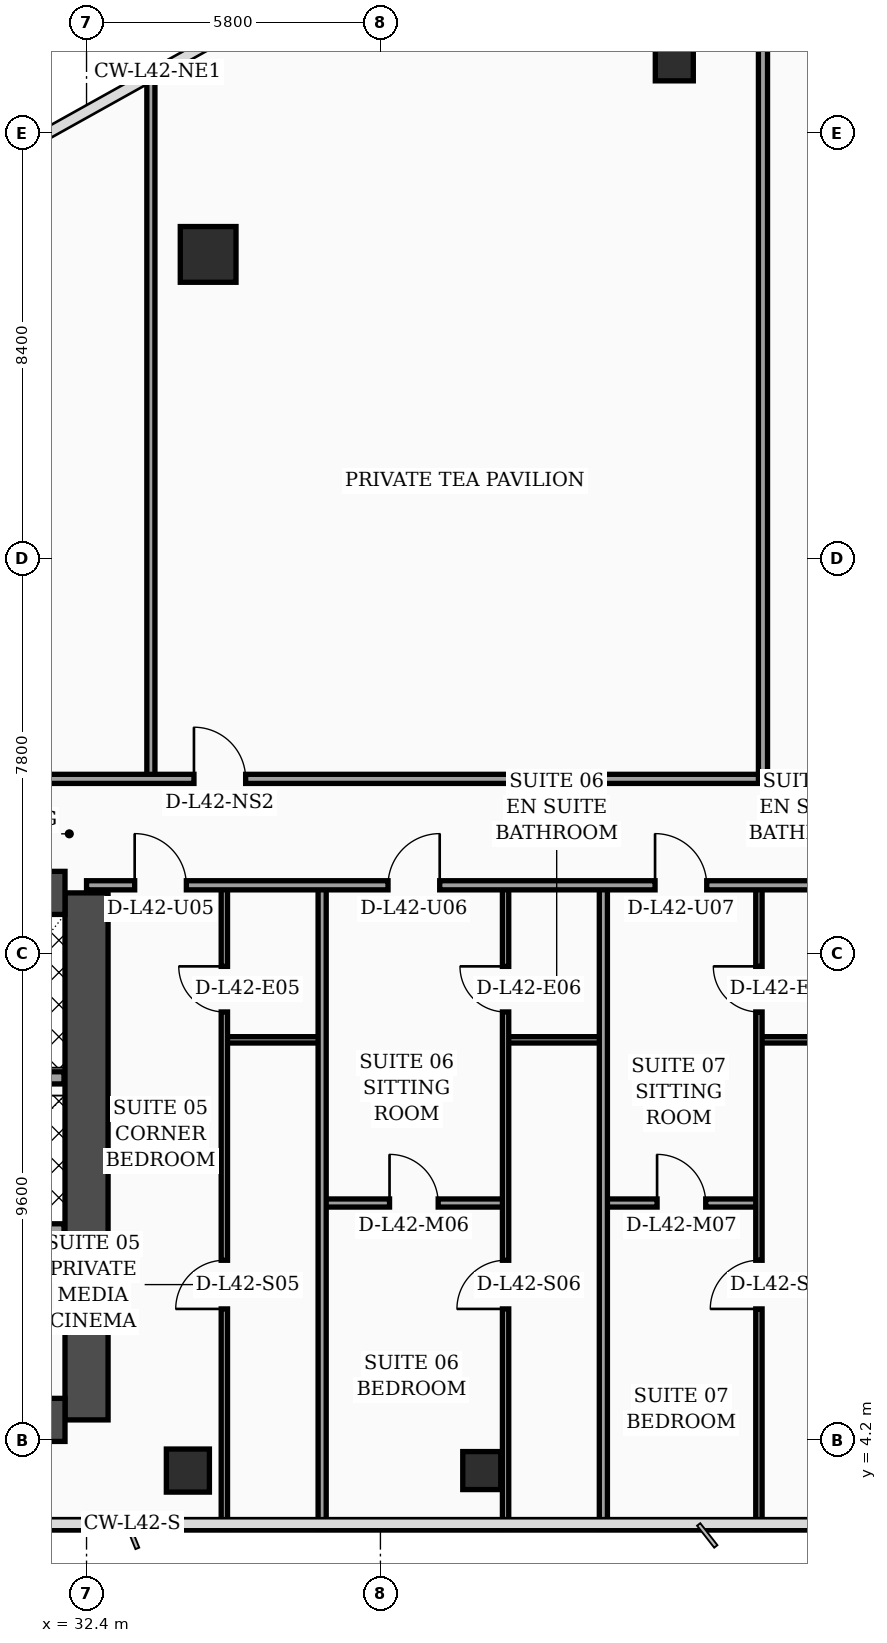
"""IFC4 building model, lengths in metres.
Left out: names, types, materials, properties, quantities, classifications, styles, units other than length and angle.
Written with IfcOpenShell. Run it as: python <this file> out.ifc"""

import sys

from ifc_helpers import new_model, si_unit, direction, frame, frame_2d, origin, origin_2d, place, context, subcontext, project, spatial, rectangle, hollow_rectangle, circle, extrude, element, fill, save


model = new_model("IFC4")
c1 = context("Model", 3, precision=1e-05, world=origin(), true_north=direction((0.0, 1.0)))
c2 = subcontext(c1, "Body", "Model", "MODEL_VIEW")
j1 = project(units=[si_unit("LENGTHUNIT", "METRE"), si_unit("PLANEANGLEUNIT", "RADIAN")], contexts=[c1])
p1 = place(None, origin())
s1 = spatial("IfcSite", under=j1, at=p1, CompositionType="ELEMENT")
p2 = place(p1, origin())
s2 = spatial("IfcBuilding", under=s1, at=p2, CompositionType="ELEMENT")
p3 = place(p2, frame((0.0, 0.0, 171.3)))
s3 = spatial("IfcBuildingStorey", under=s2, at=p3, CompositionType="ELEMENT", Elevation=171.3)
p4 = place(p3, frame((32.4, 4.6, 0.0), z_axis=(0.0, 0.0, 1.0), x_axis=(0.0, 1.0, 0.0)))
e1 = element("IfcWall", 1, at=p4, inside=s3, PredefinedType="SHEAR", context=c2, shape_type="SweptSolid", body=[
    extrude(rectangle(XDim=10.4, YDim=0.85, at=frame_2d((5.2, 0.0))), origin(), (0.0, 0.0, 1.0), 3.56),
])
p5 = place(p3, frame((22.025, 15.0, 0.0), z_axis=(0.0, 0.0, 1.0), x_axis=(1.0, 0.0, 0.0)))
e2 = element("IfcWall", 2, at=p5, inside=s3, PredefinedType="SHEAR", context=c2, shape_type="SweptSolid", body=[
    extrude(rectangle(XDim=9.95, YDim=0.85, at=frame_2d((4.975, 0.0))), origin(), (0.0, 0.0, 1.0), 3.56),
])
p6 = place(p5, frame((4.88, 0.0, 0.0)))
e3 = element("IfcOpeningElement", 3, at=p6, cuts=e2, PredefinedType="OPENING", context=c2, shape_type="SweptSolid", body=[
    extrude(rectangle(XDim=1.1, YDim=2.2, at=frame_2d((0.55, 1.1))), frame((0.0, 0.435, 0.0), z_axis=(0.0, -1.0, 0.0), x_axis=(1.0, 0.0, 0.0)), (0.0, 0.0, 1.0), 0.87),
])
p7 = place(p3, frame((22.025, 4.6, 0.0), z_axis=(0.0, 0.0, 1.0), x_axis=(1.0, 0.0, 0.0)))
e4 = element("IfcWall", 4, at=p7, inside=s3, PredefinedType="SHEAR", context=c2, shape_type="SweptSolid", body=[
    extrude(rectangle(XDim=9.95, YDim=0.85, at=frame_2d((4.975, 0.0))), origin(), (0.0, 0.0, 1.0), 3.56),
])
p8 = place(p3, frame((34.4, 3.6, 0.0), z_axis=(0.0, 0.0, 1.0), x_axis=(1.0, 0.0, 0.0)))
e5 = element("IfcColumn", 5, at=p8, inside=s3, PredefinedType="COLUMN", context=c2, shape_type="SweptSolid", body=[
    extrude(hollow_rectangle(XDim=0.85, YDim=0.85, WallThickness=0.036, at=origin_2d()), origin(), (0.0, 0.0, 1.0), 3.56),
])
p9 = place(p3, frame((40.2, 3.6, 0.0), z_axis=(0.0, 0.0, 1.0), x_axis=(1.0, 0.0, 0.0)))
e6 = element("IfcColumn", 6, at=p9, inside=s3, PredefinedType="COLUMN", context=c2, shape_type="SweptSolid", body=[
    extrude(hollow_rectangle(XDim=0.75, YDim=0.75, WallThickness=0.032, at=origin_2d()), origin(), (0.0, 0.0, 1.0), 3.56),
])
p10 = place(p3, frame((34.8, 27.6, 0.0), z_axis=(0.0, 0.0, 1.0), x_axis=(1.0, 0.0, 0.0)))
e7 = element("IfcColumn", 7, at=p10, inside=s3, PredefinedType="COLUMN", context=c2, shape_type="SweptSolid", body=[
    extrude(circle(Radius=0.55, at=origin_2d()), origin(), (0.0, 0.0, 1.0), 3.56),
])
p11 = place(p3, frame((44.0, 31.4, 0.0), z_axis=(0.0, 0.0, 1.0), x_axis=(1.0, 0.0, 0.0)))
e8 = element("IfcColumn", 8, at=p11, inside=s3, PredefinedType="COLUMN", context=c2, shape_type="SweptSolid", body=[
    extrude(hollow_rectangle(XDim=0.75, YDim=0.75, WallThickness=0.032, at=origin_2d()), origin(), (0.0, 0.0, 1.0), 3.56),
])
p12 = place(p3, frame((27.02, 11.35, 0.0), z_axis=(0.0, 0.0, 1.0), x_axis=(1.0, 0.0, 0.0)))
e9 = element("IfcWall", 9, at=p12, inside=s3, PredefinedType="SOLIDWALL", context=c2, shape_type="SweptSolid", body=[
    extrude(rectangle(XDim=4.935, YDim=0.24, at=frame_2d((2.468, 0.0))), origin(), (0.0, 0.0, 1.0), 3.56),
])
p13 = place(p12, frame((0.45, 0.0, 0.0)))
e10 = element("IfcOpeningElement", 10, at=p13, cuts=e9, PredefinedType="OPENING", context=c2, shape_type="SweptSolid", body=[
    extrude(rectangle(XDim=1.3, YDim=2.35, at=frame_2d((0.65, 1.175))), frame((0.0, 0.13, 0.0), z_axis=(0.0, -1.0, 0.0), x_axis=(1.0, 0.0, 0.0)), (0.0, 0.0, 1.0), 0.26),
])
p14 = place(p3, frame((27.02, 8.35, 0.0), z_axis=(0.0, 0.0, 1.0), x_axis=(1.0, 0.0, 0.0)))
e11 = element("IfcWall", 11, at=p14, inside=s3, PredefinedType="SOLIDWALL", context=c2, shape_type="SweptSolid", body=[
    extrude(rectangle(XDim=4.935, YDim=0.24, at=frame_2d((2.468, 0.0))), origin(), (0.0, 0.0, 1.0), 3.56),
])
p15 = place(p3, frame((35.12, 12.1, 0.0), z_axis=(0.0, 0.0, 1.0), x_axis=(1.0, 0.0, 0.0)))
e12 = element("IfcWall", 12, at=p15, inside=s3, PredefinedType="PARTITIONING", context=c2, shape_type="SweptSolid", body=[
    extrude(rectangle(XDim=1.93, YDim=0.125, at=frame_2d((0.965, 0.0))), origin(), (0.0, 0.0, 1.0), 3.56),
])
p16 = place(p3, frame((35.12, 2.44, 0.0), z_axis=(0.0, 0.0, 1.0), x_axis=(0.0, 1.0, 0.0)))
e13 = element("IfcWall", 13, at=p16, inside=s3, PredefinedType="PARTITIONING", context=c2, shape_type="SweptSolid", body=[
    extrude(rectangle(XDim=12.71, YDim=0.125, at=frame_2d((6.355, 0.0))), origin(), (0.0, 0.0, 1.0), 2.94),
])
p17 = place(p16, frame((4.35, 0.0, 0.0)))
e14 = element("IfcOpeningElement", 14, at=p17, cuts=e13, PredefinedType="OPENING", context=c2, shape_type="SweptSolid", body=[
    extrude(rectangle(XDim=0.96, YDim=2.2, at=frame_2d((0.48, 1.1))), frame((0.0, 0.073, 0.0), z_axis=(0.0, -1.0, 0.0), x_axis=(1.0, 0.0, 0.0)), (0.0, 0.0, 1.0), 0.145),
])
p18 = place(p16, frame((10.21, 0.0, 0.0)))
e15 = element("IfcOpeningElement", 15, at=p18, cuts=e13, PredefinedType="OPENING", context=c2, shape_type="SweptSolid", body=[
    extrude(rectangle(XDim=0.9, YDim=2.15, at=frame_2d((0.45, 1.075))), frame((0.0, 0.073, 0.0), z_axis=(0.0, -1.0, 0.0), x_axis=(1.0, 0.0, 0.0)), (0.0, 0.0, 1.0), 0.145),
])
p19 = place(p3, frame((40.67, 12.1, 0.0), z_axis=(0.0, 0.0, 1.0), x_axis=(1.0, 0.0, 0.0)))
e16 = element("IfcWall", 16, at=p19, inside=s3, PredefinedType="PARTITIONING", context=c2, shape_type="SweptSolid", body=[
    extrude(rectangle(XDim=1.93, YDim=0.125, at=frame_2d((0.965, 0.0))), origin(), (0.0, 0.0, 1.0), 3.56),
])
p20 = place(p3, frame((37.05, 8.88, 0.0), z_axis=(0.0, 0.0, 1.0), x_axis=(1.0, 0.0, 0.0)))
e17 = element("IfcWall", 17, at=p20, inside=s3, PredefinedType="PARTITIONING", context=c2, shape_type="SweptSolid", body=[
    extrude(rectangle(XDim=3.62, YDim=0.16, at=frame_2d((1.81, 0.0))), origin(), (0.0, 0.0, 1.0), 2.94),
])
p21 = place(p20, frame((1.33, 0.0, 0.0)))
e18 = element("IfcOpeningElement", 18, at=p21, cuts=e17, PredefinedType="OPENING", context=c2, shape_type="SweptSolid", body=[
    extrude(rectangle(XDim=0.96, YDim=2.2, at=frame_2d((0.48, 1.1))), frame((0.0, 0.09, 0.0), z_axis=(0.0, -1.0, 0.0), x_axis=(1.0, 0.0, 0.0)), (0.0, 0.0, 1.0), 0.18),
])
p22 = place(p3, frame((40.67, 2.44, 0.0), z_axis=(0.0, 0.0, 1.0), x_axis=(0.0, 1.0, 0.0)))
e19 = element("IfcWall", 19, at=p22, inside=s3, PredefinedType="PARTITIONING", context=c2, shape_type="SweptSolid", body=[
    extrude(rectangle(XDim=12.71, YDim=0.125, at=frame_2d((6.355, 0.0))), origin(), (0.0, 0.0, 1.0), 2.94),
])
p23 = place(p22, frame((4.35, 0.0, 0.0)))
e20 = element("IfcOpeningElement", 20, at=p23, cuts=e19, PredefinedType="OPENING", context=c2, shape_type="SweptSolid", body=[
    extrude(rectangle(XDim=0.96, YDim=2.2, at=frame_2d((0.48, 1.1))), frame((0.0, 0.073, 0.0), z_axis=(0.0, -1.0, 0.0), x_axis=(1.0, 0.0, 0.0)), (0.0, 0.0, 1.0), 0.145),
])
p24 = place(p22, frame((10.21, 0.0, 0.0)))
e21 = element("IfcOpeningElement", 21, at=p24, cuts=e19, PredefinedType="OPENING", context=c2, shape_type="SweptSolid", body=[
    extrude(rectangle(XDim=0.9, YDim=2.15, at=frame_2d((0.45, 1.075))), frame((0.0, 0.073, 0.0), z_axis=(0.0, -1.0, 0.0), x_axis=(1.0, 0.0, 0.0)), (0.0, 0.0, 1.0), 0.145),
])
p25 = place(p3, frame((37.05, 2.44, 0.0), z_axis=(0.0, 0.0, 1.0), x_axis=(0.0, 1.0, 0.0)))
e22 = element("IfcWall", 22, at=p25, inside=s3, PredefinedType="PARTITIONING", context=c2, shape_type="SweptSolid", body=[
    extrude(rectangle(XDim=12.71, YDim=0.16, at=frame_2d((6.355, 0.0))), origin(), (0.0, 0.0, 1.0), 2.94),
])
p26 = place(p3, frame((45.67, 12.1, 0.0), z_axis=(0.0, 0.0, 1.0), x_axis=(1.0, 0.0, 0.0)))
e23 = element("IfcWall", 23, at=p26, inside=s3, PredefinedType="PARTITIONING", context=c2, shape_type="SweptSolid", body=[
    extrude(rectangle(XDim=1.93, YDim=0.125, at=frame_2d((0.965, 0.0))), origin(), (0.0, 0.0, 1.0), 2.94),
])
p27 = place(p3, frame((42.6, 8.88, 0.0), z_axis=(0.0, 0.0, 1.0), x_axis=(1.0, 0.0, 0.0)))
e24 = element("IfcWall", 24, at=p27, inside=s3, PredefinedType="PARTITIONING", context=c2, shape_type="SweptSolid", body=[
    extrude(rectangle(XDim=3.07, YDim=0.16, at=frame_2d((1.535, 0.0))), origin(), (0.0, 0.0, 1.0), 3.56),
])
p28 = place(p27, frame((1.06, 0.0, 0.0)))
e25 = element("IfcOpeningElement", 25, at=p28, cuts=e24, PredefinedType="OPENING", context=c2, shape_type="SweptSolid", body=[
    extrude(rectangle(XDim=0.96, YDim=2.2, at=frame_2d((0.48, 1.1))), frame((0.0, 0.09, 0.0), z_axis=(0.0, -1.0, 0.0), x_axis=(1.0, 0.0, 0.0)), (0.0, 0.0, 1.0), 0.18),
])
p29 = place(p3, frame((45.67, 2.44, 0.0), z_axis=(0.0, 0.0, 1.0), x_axis=(0.0, 1.0, 0.0)))
e26 = element("IfcWall", 26, at=p29, inside=s3, PredefinedType="PARTITIONING", context=c2, shape_type="SweptSolid", body=[
    extrude(rectangle(XDim=12.71, YDim=0.125, at=frame_2d((6.355, 0.0))), origin(), (0.0, 0.0, 1.0), 3.04),
])
p30 = place(p29, frame((4.35, 0.0, 0.0)))
e27 = element("IfcOpeningElement", 27, at=p30, cuts=e26, PredefinedType="OPENING", context=c2, shape_type="SweptSolid", body=[
    extrude(rectangle(XDim=0.96, YDim=2.2, at=frame_2d((0.48, 1.1))), frame((0.0, 0.073, 0.0), z_axis=(0.0, -1.0, 0.0), x_axis=(1.0, 0.0, 0.0)), (0.0, 0.0, 1.0), 0.145),
])
p31 = place(p29, frame((10.21, 0.0, 0.0)))
e28 = element("IfcOpeningElement", 28, at=p31, cuts=e26, PredefinedType="OPENING", context=c2, shape_type="SweptSolid", body=[
    extrude(rectangle(XDim=0.9, YDim=2.15, at=frame_2d((0.45, 1.075))), frame((0.0, 0.073, 0.0), z_axis=(0.0, -1.0, 0.0), x_axis=(1.0, 0.0, 0.0)), (0.0, 0.0, 1.0), 0.145),
])
p32 = place(p3, frame((42.6, 2.44, 0.0), z_axis=(0.0, 0.0, 1.0), x_axis=(0.0, 1.0, 0.0)))
e29 = element("IfcWall", 29, at=p32, inside=s3, PredefinedType="PARTITIONING", context=c2, shape_type="SweptSolid", body=[
    extrude(rectangle(XDim=12.71, YDim=0.16, at=frame_2d((6.355, 0.0))), origin(), (0.0, 0.0, 1.0), 3.04),
])
p33 = place(p3, frame((32.4, 15.15, 0.0), z_axis=(0.0, 0.0, 1.0), x_axis=(1.0, 0.0, 0.0)))
e30 = element("IfcWall", 30, at=p33, inside=s3, PredefinedType="PARTITIONING", context=c2, shape_type="SweptSolid", body=[
    extrude(rectangle(XDim=20.2, YDim=0.18, at=frame_2d((10.1, 0.0))), origin(), (0.0, 0.0, 1.0), 2.94),
])
p34 = place(p33, frame((0.95, 0.0, 0.0)))
e31 = element("IfcOpeningElement", 31, at=p34, cuts=e30, PredefinedType="OPENING", context=c2, shape_type="SweptSolid", body=[
    extrude(rectangle(XDim=1.02, YDim=2.2, at=frame_2d((0.51, 1.1))), frame((0.0, 0.1, 0.0), z_axis=(0.0, -1.0, 0.0), x_axis=(1.0, 0.0, 0.0)), (0.0, 0.0, 1.0), 0.2),
])
p35 = place(p33, frame((5.95, 0.0, 0.0)))
e32 = element("IfcOpeningElement", 32, at=p35, cuts=e30, PredefinedType="OPENING", context=c2, shape_type="SweptSolid", body=[
    extrude(rectangle(XDim=1.02, YDim=2.2, at=frame_2d((0.51, 1.1))), frame((0.0, 0.1, 0.0), z_axis=(0.0, -1.0, 0.0), x_axis=(1.0, 0.0, 0.0)), (0.0, 0.0, 1.0), 0.2),
])
p36 = place(p33, frame((11.22, 0.0, 0.0)))
e33 = element("IfcOpeningElement", 33, at=p36, cuts=e30, PredefinedType="OPENING", context=c2, shape_type="SweptSolid", body=[
    extrude(rectangle(XDim=1.02, YDim=2.2, at=frame_2d((0.51, 1.1))), frame((0.0, 0.1, 0.0), z_axis=(0.0, -1.0, 0.0), x_axis=(1.0, 0.0, 0.0)), (0.0, 0.0, 1.0), 0.2),
])
p37 = place(p33, frame((16.22, 0.0, 0.0)))
e34 = element("IfcOpeningElement", 34, at=p37, cuts=e30, PredefinedType="OPENING", context=c2, shape_type="SweptSolid", body=[
    extrude(rectangle(XDim=1.02, YDim=2.2, at=frame_2d((0.51, 1.1))), frame((0.0, 0.1, 0.0), z_axis=(0.0, -1.0, 0.0), x_axis=(1.0, 0.0, 0.0)), (0.0, 0.0, 1.0), 0.2),
])
p38 = place(p3, frame((33.67, 17.25, 0.0), z_axis=(0.0, 0.0, 1.0), x_axis=(0.0, 1.0, 0.0)))
e35 = element("IfcWall", 35, at=p38, inside=s3, PredefinedType="PARTITIONING", context=c2, shape_type="SweptSolid", body=[
    extrude(rectangle(XDim=13.96, YDim=0.16, at=frame_2d((6.98, 0.0))), origin(), (0.0, 0.0, 1.0), 2.94),
])
p39 = place(p3, frame((21.5, 17.25, 0.0), z_axis=(0.0, 0.0, 1.0), x_axis=(1.0, 0.0, 0.0)))
e36 = element("IfcWall", 36, at=p39, inside=s3, PredefinedType="PARTITIONING", context=c2, shape_type="SweptSolid", body=[
    extrude(rectangle(XDim=24.25, YDim=0.18, at=frame_2d((12.125, 0.0))), origin(), (0.0, 0.0, 1.0), 2.94),
])
p40 = place(p39, frame((0.95, 0.0, 0.0)))
e37 = element("IfcOpeningElement", 37, at=p40, cuts=e36, PredefinedType="OPENING", context=c2, shape_type="SweptSolid", body=[
    extrude(rectangle(XDim=1.02, YDim=2.2, at=frame_2d((0.51, 1.1))), frame((0.0, 0.1, 0.0), z_axis=(0.0, -1.0, 0.0), x_axis=(1.0, 0.0, 0.0)), (0.0, 0.0, 1.0), 0.2),
])
p41 = place(p39, frame((13.02, 0.0, 0.0)))
e38 = element("IfcOpeningElement", 38, at=p41, cuts=e36, PredefinedType="OPENING", context=c2, shape_type="SweptSolid", body=[
    extrude(rectangle(XDim=1.02, YDim=2.2, at=frame_2d((0.51, 1.1))), frame((0.0, 0.1, 0.0), z_axis=(0.0, -1.0, 0.0), x_axis=(1.0, 0.0, 0.0)), (0.0, 0.0, 1.0), 0.2),
])
p42 = place(p3, frame((45.75, 17.25, 0.0), z_axis=(0.0, 0.0, 1.0), x_axis=(0.0, 1.0, 0.0)))
e39 = element("IfcWall", 39, at=p42, inside=s3, PredefinedType="PARTITIONING", context=c2, shape_type="SweptSolid", body=[
    extrude(rectangle(XDim=20.69, YDim=0.18, at=frame_2d((10.345, 0.0))), origin(), (0.0, 0.0, 1.0), 2.94),
])
p43 = place(p17, origin())
e40 = element("IfcDoor", 40, at=p43, inside=s3, OperationType="SINGLE_SWING_LEFT", PredefinedType="DOOR", context=c2, shape_type="SweptSolid", body=[
    extrude(rectangle(XDim=0.96, YDim=2.2, at=frame_2d((0.48, 1.1))), frame((0.0, 0.025, 0.0), z_axis=(0.0, -1.0, 0.0), x_axis=(1.0, 0.0, 0.0)), (0.0, 0.0, 1.0), 0.05),
])
fill(e14, e40)
p44 = place(p18, origin())
e41 = element("IfcDoor", 41, at=p44, inside=s3, OperationType="SINGLE_SWING_RIGHT", PredefinedType="DOOR", context=c2, shape_type="SweptSolid", body=[
    extrude(rectangle(XDim=0.9, YDim=2.15, at=frame_2d((0.45, 1.075))), frame((0.0, 0.025, 0.0), z_axis=(0.0, -1.0, 0.0), x_axis=(1.0, 0.0, 0.0)), (0.0, 0.0, 1.0), 0.05),
])
fill(e15, e41)
p45 = place(p21, origin())
e42 = element("IfcDoor", 42, at=p45, inside=s3, OperationType="SINGLE_SWING_LEFT", PredefinedType="DOOR", context=c2, shape_type="SweptSolid", body=[
    extrude(rectangle(XDim=0.96, YDim=2.2, at=frame_2d((0.48, 1.1))), frame((0.0, 0.025, 0.0), z_axis=(0.0, -1.0, 0.0), x_axis=(1.0, 0.0, 0.0)), (0.0, 0.0, 1.0), 0.05),
])
fill(e18, e42)
p46 = place(p23, origin())
e43 = element("IfcDoor", 43, at=p46, inside=s3, OperationType="SINGLE_SWING_LEFT", PredefinedType="DOOR", context=c2, shape_type="SweptSolid", body=[
    extrude(rectangle(XDim=0.96, YDim=2.2, at=frame_2d((0.48, 1.1))), frame((0.0, 0.025, 0.0), z_axis=(0.0, -1.0, 0.0), x_axis=(1.0, 0.0, 0.0)), (0.0, 0.0, 1.0), 0.05),
])
fill(e20, e43)
p47 = place(p24, origin())
e44 = element("IfcDoor", 44, at=p47, inside=s3, OperationType="SINGLE_SWING_RIGHT", PredefinedType="DOOR", context=c2, shape_type="SweptSolid", body=[
    extrude(rectangle(XDim=0.9, YDim=2.15, at=frame_2d((0.45, 1.075))), frame((0.0, 0.025, 0.0), z_axis=(0.0, -1.0, 0.0), x_axis=(1.0, 0.0, 0.0)), (0.0, 0.0, 1.0), 0.05),
])
fill(e21, e44)
p48 = place(p28, origin())
e45 = element("IfcDoor", 45, at=p48, inside=s3, OperationType="SINGLE_SWING_LEFT", PredefinedType="DOOR", context=c2, shape_type="SweptSolid", body=[
    extrude(rectangle(XDim=0.96, YDim=2.2, at=frame_2d((0.48, 1.1))), frame((0.0, 0.025, 0.0), z_axis=(0.0, -1.0, 0.0), x_axis=(1.0, 0.0, 0.0)), (0.0, 0.0, 1.0), 0.05),
])
fill(e25, e45)
p49 = place(p30, origin())
e46 = element("IfcDoor", 46, at=p49, inside=s3, OperationType="SINGLE_SWING_LEFT", PredefinedType="DOOR", context=c2, shape_type="SweptSolid", body=[
    extrude(rectangle(XDim=0.96, YDim=2.2, at=frame_2d((0.48, 1.1))), frame((0.0, 0.025, 0.0), z_axis=(0.0, -1.0, 0.0), x_axis=(1.0, 0.0, 0.0)), (0.0, 0.0, 1.0), 0.05),
])
fill(e27, e46)
p50 = place(p31, origin())
e47 = element("IfcDoor", 47, at=p50, inside=s3, OperationType="SINGLE_SWING_RIGHT", PredefinedType="DOOR", context=c2, shape_type="SweptSolid", body=[
    extrude(rectangle(XDim=0.9, YDim=2.15, at=frame_2d((0.45, 1.075))), frame((0.0, 0.025, 0.0), z_axis=(0.0, -1.0, 0.0), x_axis=(1.0, 0.0, 0.0)), (0.0, 0.0, 1.0), 0.05),
])
fill(e28, e47)
p51 = place(p34, origin())
e48 = element("IfcDoor", 48, at=p51, inside=s3, OperationType="SINGLE_SWING_LEFT", PredefinedType="DOOR", context=c2, shape_type="SweptSolid", body=[
    extrude(rectangle(XDim=1.02, YDim=2.2, at=frame_2d((0.51, 1.1))), frame((0.0, 0.025, 0.0), z_axis=(0.0, -1.0, 0.0), x_axis=(1.0, 0.0, 0.0)), (0.0, 0.0, 1.0), 0.05),
])
fill(e31, e48)
p52 = place(p35, origin())
e49 = element("IfcDoor", 49, at=p52, inside=s3, OperationType="SINGLE_SWING_RIGHT", PredefinedType="DOOR", context=c2, shape_type="SweptSolid", body=[
    extrude(rectangle(XDim=1.02, YDim=2.2, at=frame_2d((0.51, 1.1))), frame((0.0, 0.025, 0.0), z_axis=(0.0, -1.0, 0.0), x_axis=(1.0, 0.0, 0.0)), (0.0, 0.0, 1.0), 0.05),
])
fill(e32, e49)
p53 = place(p36, origin())
e50 = element("IfcDoor", 50, at=p53, inside=s3, OperationType="SINGLE_SWING_LEFT", PredefinedType="DOOR", context=c2, shape_type="SweptSolid", body=[
    extrude(rectangle(XDim=1.02, YDim=2.2, at=frame_2d((0.51, 1.1))), frame((0.0, 0.025, 0.0), z_axis=(0.0, -1.0, 0.0), x_axis=(1.0, 0.0, 0.0)), (0.0, 0.0, 1.0), 0.05),
])
fill(e33, e50)
p54 = place(p41, origin())
e51 = element("IfcDoor", 51, at=p54, inside=s3, OperationType="SINGLE_SWING_LEFT", PredefinedType="DOOR", context=c2, shape_type="SweptSolid", body=[
    extrude(rectangle(XDim=1.02, YDim=2.2, at=frame_2d((0.51, 1.1))), frame((0.0, 0.025, 0.0), z_axis=(0.0, -1.0, 0.0), x_axis=(1.0, 0.0, 0.0)), (0.0, 0.0, 1.0), 0.05),
])
fill(e38, e51)
save(model, sys.argv[1])
